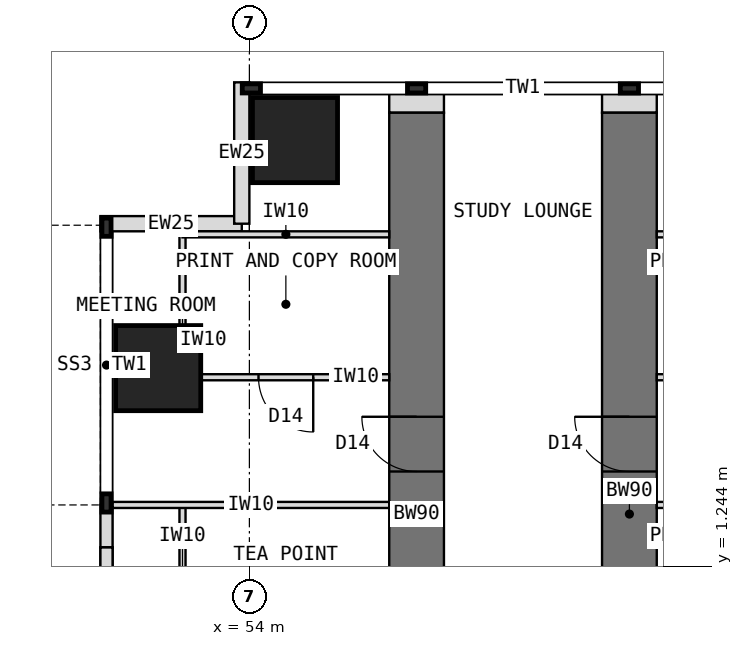
"""IFC4 building model, lengths in metres.
Left out: names, types, materials, properties, quantities, classifications, styles, units other than length and angle.
Written with IfcOpenShell. Run it as: python <this file> out.ifc"""

import sys

from ifc_helpers import new_model, si_unit, direction, frame, frame_2d, origin, origin_2d, place, context, subcontext, project, spatial, rectangle, extrude, element, fill, save


model = new_model("IFC4")
c1 = context("Model", 3, precision=1e-05, world=origin(), true_north=direction((0.0, 1.0)))
c2 = subcontext(c1, "Body", "Model", "MODEL_VIEW")
j1 = project(units=[si_unit("LENGTHUNIT", "METRE"), si_unit("PLANEANGLEUNIT", "RADIAN")], contexts=[c1])
p1 = place(None, origin())
s1 = spatial("IfcSite", under=j1, at=p1, CompositionType="ELEMENT")
p2 = place(p1, origin())
s2 = spatial("IfcBuilding", under=s1, at=p2, CompositionType="ELEMENT")
p3 = place(p2, frame((0.0, 0.0, 88.5)))
s3 = spatial("IfcBuildingStorey", under=s2, at=p3, CompositionType="ELEMENT", Elevation=88.5)
p4 = place(p3, frame((56.75, -4.5, 0.0), z_axis=(0.0, 0.0, 1.0), x_axis=(0.0, 1.0, 0.0)))
e1 = element("IfcWall", 1, at=p4, inside=s3, PredefinedType="SHEAR", context=c2, shape_type="SweptSolid", body=[
    extrude(rectangle(XDim=13.2, YDim=0.9, at=frame_2d((6.6, 0.0))), origin(), (0.0, 0.0, 1.0), 4.0),
])
p5 = place(p4, frame((0.55, 0.0, 0.0)))
e2 = element("IfcOpeningElement", 2, at=p5, cuts=e1, PredefinedType="OPENING", context=c2, shape_type="SweptSolid", body=[
    extrude(rectangle(XDim=0.9, YDim=2.1, at=frame_2d((0.45, 1.05))), frame((0.0, 0.46, 0.0), z_axis=(0.0, -1.0, 0.0), x_axis=(1.0, 0.0, 0.0)), (0.0, 0.0, 1.0), 0.92),
])
p6 = place(p4, frame((2.8, 0.0, 0.0)))
e3 = element("IfcOpeningElement", 3, at=p6, cuts=e1, PredefinedType="OPENING", context=c2, shape_type="SweptSolid", body=[
    extrude(rectangle(XDim=0.9, YDim=2.1, at=frame_2d((0.45, 1.05))), frame((0.0, 0.46, 0.0), z_axis=(0.0, -1.0, 0.0), x_axis=(1.0, 0.0, 0.0)), (0.0, 0.0, 1.0), 0.92),
])
p7 = place(p4, frame((7.3, 0.0, 0.0)))
e4 = element("IfcOpeningElement", 4, at=p7, cuts=e1, PredefinedType="OPENING", context=c2, shape_type="SweptSolid", body=[
    extrude(rectangle(XDim=0.9, YDim=2.1, at=frame_2d((0.45, 1.05))), frame((0.0, 0.46, 0.0), z_axis=(0.0, -1.0, 0.0), x_axis=(1.0, 0.0, 0.0)), (0.0, 0.0, 1.0), 0.92),
])
p8 = place(p3, frame((60.25, -4.5, 0.0), z_axis=(0.0, 0.0, 1.0), x_axis=(0.0, 1.0, 0.0)))
e5 = element("IfcWall", 5, at=p8, inside=s3, PredefinedType="SHEAR", context=c2, shape_type="SweptSolid", body=[
    extrude(rectangle(XDim=13.2, YDim=0.9, at=frame_2d((6.6, 0.0))), origin(), (0.0, 0.0, 1.0), 4.0),
])
p9 = place(p8, frame((0.55, 0.0, 0.0)))
e6 = element("IfcOpeningElement", 6, at=p9, cuts=e5, PredefinedType="OPENING", context=c2, shape_type="SweptSolid", body=[
    extrude(rectangle(XDim=0.9, YDim=2.1, at=frame_2d((0.45, 1.05))), frame((0.0, 0.46, 0.0), z_axis=(0.0, -1.0, 0.0), x_axis=(1.0, 0.0, 0.0)), (0.0, 0.0, 1.0), 0.92),
])
p10 = place(p8, frame((2.8, 0.0, 0.0)))
e7 = element("IfcOpeningElement", 7, at=p10, cuts=e5, PredefinedType="OPENING", context=c2, shape_type="SweptSolid", body=[
    extrude(rectangle(XDim=0.9, YDim=2.1, at=frame_2d((0.45, 1.05))), frame((0.0, 0.46, 0.0), z_axis=(0.0, -1.0, 0.0), x_axis=(1.0, 0.0, 0.0)), (0.0, 0.0, 1.0), 0.92),
])
p11 = place(p8, frame((7.3, 0.0, 0.0)))
e8 = element("IfcOpeningElement", 8, at=p11, cuts=e5, PredefinedType="OPENING", context=c2, shape_type="SweptSolid", body=[
    extrude(rectangle(XDim=0.9, YDim=2.1, at=frame_2d((0.45, 1.05))), frame((0.0, 0.46, 0.0), z_axis=(0.0, -1.0, 0.0), x_axis=(1.0, 0.0, 0.0)), (0.0, 0.0, 1.0), 0.92),
])
for number, where, z_axis, x_axis in (
    (9, (52.5, 4.5, 0.0), (0.0, 0.0, 1.0), (1.0, 0.0, 0.0)),
    (10, (54.75, 8.25, 0.0), (0.0, 0.0, 1.0), (1.0, 0.0, 0.0)),
):
    element("IfcColumn", number, at=place(p3, frame(where, z_axis=z_axis, x_axis=x_axis)), inside=s3, PredefinedType="COLUMN", context=c2, shape_type="SweptSolid", body=[
        extrude(rectangle(XDim=1.4, YDim=1.4, at=origin_2d()), origin(), (0.0, 0.0, 1.0), 4.0),
    ])
p12 = place(p3, frame((51.65, 1.551, 0.0), z_axis=(0.0, 0.0, 1.0), x_axis=(0.0, 1.0, 0.0)))
e11 = element("IfcWall", 11, at=p12, inside=s3, PredefinedType="STANDARD", context=c2, shape_type="SweptSolid", body=[
    extrude(rectangle(XDim=0.699, YDim=0.2, at=frame_2d((0.35, 0.0))), origin(), (0.0, 0.0, 1.0), 4.0),
])
p13 = place(p3, frame((51.65, -1.551, 0.0), z_axis=(0.0, 0.0, 1.0), x_axis=(0.0, 1.0, 0.0)))
e12 = element("IfcWall", 12, at=p13, inside=s3, PredefinedType="STANDARD", context=c2, shape_type="SweptSolid", body=[
    extrude(rectangle(XDim=3.102, YDim=0.2, at=frame_2d((1.551, 0.0))), origin(), (0.0, 0.0, 1.0), 1.611),
])
p14 = place(p3, frame((51.65, -1.551, 2.821), z_axis=(0.0, 0.0, 1.0), x_axis=(0.0, 1.0, 0.0)))
e13 = element("IfcWall", 13, at=p14, inside=s3, PredefinedType="STANDARD", context=c2, shape_type="SweptSolid", body=[
    extrude(rectangle(XDim=3.102, YDim=0.2, at=frame_2d((1.551, 0.0))), origin(), (0.0, 0.0, 1.0), 1.179),
])
for number, where, z_axis, x_axis in (
    (14, (51.55, 6.875, 0.0), (0.0, 0.0, 1.0), (1.0, 0.0, 0.0)),
    (15, (53.875, 6.875, 0.0), (0.0, 0.0, 1.0), (0.0, 1.0, 0.0)),
):
    element("IfcWall", number, at=place(p3, frame(where, z_axis=z_axis, x_axis=x_axis)), inside=s3, PredefinedType="STANDARD", context=c2, shape_type="SweptSolid", body=[
        extrude(rectangle(XDim=2.325, YDim=0.25, at=frame_2d((1.163, 0.0))), origin(), (0.0, 0.0, 1.0), 3.7),
    ])
for number, where, z_axis, x_axis in (
    (16, (56.75, 8.7, 0.0), (0.0, 0.0, 1.0), (0.0, 1.0, 0.0)),
    (17, (60.25, 8.7, 0.0), (0.0, 0.0, 1.0), (0.0, 1.0, 0.0)),
):
    element("IfcWall", number, at=place(p3, frame(where, z_axis=z_axis, x_axis=x_axis)), inside=s3, PredefinedType="PARTITIONING", context=c2, shape_type="SweptSolid", body=[
        extrude(rectangle(XDim=0.31, YDim=0.9, at=frame_2d((0.155, 0.0))), origin(), (0.0, 0.0, 1.0), 3.7),
    ])
p15 = place(p3, frame((56.3, 2.25, 0.0), z_axis=(0.0, 0.0, 1.0), x_axis=(-1.0, 0.0, 0.0)))
e18 = element("IfcWall", 18, at=p15, inside=s3, PredefinedType="PARTITIONING", context=c2, shape_type="SweptSolid", body=[
    extrude(rectangle(XDim=4.55, YDim=0.1, at=frame_2d((2.275, 0.0))), origin(), (0.0, 0.0, 1.0), 3.7),
])
for number, where, z_axis, x_axis in (
    (19, (52.9, -0.15, 0.0), (0.0, 0.0, 1.0), (0.0, 1.0, 0.0)),
    (20, (52.9, 4.35, 0.0), (0.0, 0.0, 1.0), (0.0, 1.0, 0.0)),
):
    element("IfcWall", number, at=place(p3, frame(where, z_axis=z_axis, x_axis=x_axis)), inside=s3, PredefinedType="PARTITIONING", context=c2, shape_type="SweptSolid", body=[
        extrude(rectangle(XDim=2.4, YDim=0.1, at=frame_2d((1.2, 0.0))), origin(), (0.0, 0.0, 1.0), 3.7),
    ])
p16 = place(p3, frame((56.3, 4.35, 0.0), z_axis=(0.0, 0.0, 1.0), x_axis=(-1.0, 0.0, 0.0)))
e21 = element("IfcWall", 21, at=p16, inside=s3, PredefinedType="PARTITIONING", context=c2, shape_type="SweptSolid", body=[
    extrude(rectangle(XDim=3.4, YDim=0.1, at=frame_2d((1.7, 0.0))), origin(), (0.0, 0.0, 1.0), 3.7),
])
p17 = place(p16, frame((1.25, 0.0, 0.0)))
e22 = element("IfcOpeningElement", 22, at=p17, cuts=e21, PredefinedType="OPENING", context=c2, shape_type="SweptSolid", body=[
    extrude(rectangle(XDim=0.9, YDim=2.1, at=frame_2d((0.45, 1.05))), frame((0.0, 0.06, 0.0), z_axis=(0.0, -1.0, 0.0), x_axis=(1.0, 0.0, 0.0)), (0.0, 0.0, 1.0), 0.12),
])
p18 = place(p3, frame((56.3, 6.7, 0.0), z_axis=(0.0, 0.0, 1.0), x_axis=(-1.0, 0.0, 0.0)))
e23 = element("IfcWall", 23, at=p18, inside=s3, PredefinedType="PARTITIONING", context=c2, shape_type="SweptSolid", body=[
    extrude(rectangle(XDim=3.4, YDim=0.1, at=frame_2d((1.7, 0.0))), origin(), (0.0, 0.0, 1.0), 3.7),
])
p19 = place(p3, frame((60.7, 2.25, 0.0), z_axis=(0.0, 0.0, 1.0), x_axis=(1.0, 0.0, 0.0)))
e24 = element("IfcWall", 24, at=p19, inside=s3, PredefinedType="PARTITIONING", context=c2, shape_type="SweptSolid", body=[
    extrude(rectangle(XDim=4.55, YDim=0.1, at=frame_2d((2.275, 0.0))), origin(), (0.0, 0.0, 1.0), 3.7),
])
p20 = place(p3, frame((60.7, 4.35, 0.0), z_axis=(0.0, 0.0, 1.0), x_axis=(1.0, 0.0, 0.0)))
e25 = element("IfcWall", 25, at=p20, inside=s3, PredefinedType="PARTITIONING", context=c2, shape_type="SweptSolid", body=[
    extrude(rectangle(XDim=3.4, YDim=0.1, at=frame_2d((1.7, 0.0))), origin(), (0.0, 0.0, 1.0), 3.7),
])
p21 = place(p20, frame((1.25, 0.0, 0.0)))
e26 = element("IfcOpeningElement", 26, at=p21, cuts=e25, PredefinedType="OPENING", context=c2, shape_type="SweptSolid", body=[
    extrude(rectangle(XDim=0.9, YDim=2.1, at=frame_2d((0.45, 1.05))), frame((0.0, 0.06, 0.0), z_axis=(0.0, -1.0, 0.0), x_axis=(1.0, 0.0, 0.0)), (0.0, 0.0, 1.0), 0.12),
])
p22 = place(p3, frame((60.7, 6.7, 0.0), z_axis=(0.0, 0.0, 1.0), x_axis=(1.0, 0.0, 0.0)))
e27 = element("IfcWall", 27, at=p22, inside=s3, PredefinedType="PARTITIONING", context=c2, shape_type="SweptSolid", body=[
    extrude(rectangle(XDim=3.4, YDim=0.1, at=frame_2d((1.7, 0.0))), origin(), (0.0, 0.0, 1.0), 3.7),
])
p23 = place(p17, origin())
e28 = element("IfcDoor", 28, at=p23, inside=s3, OperationType="SINGLE_SWING_LEFT", PredefinedType="DOOR", context=c2, shape_type="SweptSolid", body=[
    extrude(rectangle(XDim=0.9, YDim=2.1, at=frame_2d((0.45, 1.05))), frame((0.0, 0.025, 0.0), z_axis=(0.0, -1.0, 0.0), x_axis=(1.0, 0.0, 0.0)), (0.0, 0.0, 1.0), 0.05),
])
fill(e22, e28)
p24 = place(p7, origin())
e29 = element("IfcDoor", 29, at=p24, inside=s3, OperationType="SINGLE_SWING_RIGHT", PredefinedType="DOOR", context=c2, shape_type="SweptSolid", body=[
    extrude(rectangle(XDim=0.82, YDim=2.06, at=frame_2d((0.45, 1.03))), frame((0.0, 0.025, 0.0), z_axis=(0.0, -1.0, 0.0), x_axis=(1.0, 0.0, 0.0)), (0.0, 0.0, 1.0), 0.05),
    extrude(rectangle(XDim=0.04, YDim=2.1, at=frame_2d((0.02, 1.05))), frame((0.0, 0.45, 0.0), z_axis=(0.0, -1.0, 0.0), x_axis=(1.0, 0.0, 0.0)), (0.0, 0.0, 1.0), 0.899),
    extrude(rectangle(XDim=0.04, YDim=2.1, at=frame_2d((0.88, 1.05))), frame((0.0, 0.45, 0.0), z_axis=(0.0, -1.0, 0.0), x_axis=(1.0, 0.0, 0.0)), (0.0, 0.0, 1.0), 0.899),
    extrude(rectangle(XDim=0.82, YDim=0.04, at=frame_2d((0.45, 2.08))), frame((0.0, 0.45, 0.0), z_axis=(0.0, -1.0, 0.0), x_axis=(1.0, 0.0, 0.0)), (0.0, 0.0, 1.0), 0.899),
])
fill(e4, e29)
p25 = place(p11, origin())
e30 = element("IfcDoor", 30, at=p25, inside=s3, OperationType="SINGLE_SWING_RIGHT", PredefinedType="DOOR", context=c2, shape_type="SweptSolid", body=[
    extrude(rectangle(XDim=0.82, YDim=2.06, at=frame_2d((0.45, 1.03))), frame((0.0, 0.025, 0.0), z_axis=(0.0, -1.0, 0.0), x_axis=(1.0, 0.0, 0.0)), (0.0, 0.0, 1.0), 0.05),
    extrude(rectangle(XDim=0.04, YDim=2.1, at=frame_2d((0.02, 1.05))), frame((0.0, 0.45, 0.0), z_axis=(0.0, -1.0, 0.0), x_axis=(1.0, 0.0, 0.0)), (0.0, 0.0, 1.0), 0.899),
    extrude(rectangle(XDim=0.04, YDim=2.1, at=frame_2d((0.88, 1.05))), frame((0.0, 0.45, 0.0), z_axis=(0.0, -1.0, 0.0), x_axis=(1.0, 0.0, 0.0)), (0.0, 0.0, 1.0), 0.899),
    extrude(rectangle(XDim=0.82, YDim=0.04, at=frame_2d((0.45, 2.08))), frame((0.0, 0.45, 0.0), z_axis=(0.0, -1.0, 0.0), x_axis=(1.0, 0.0, 0.0)), (0.0, 0.0, 1.0), 0.899),
])
fill(e8, e30)
save(model, sys.argv[1])
